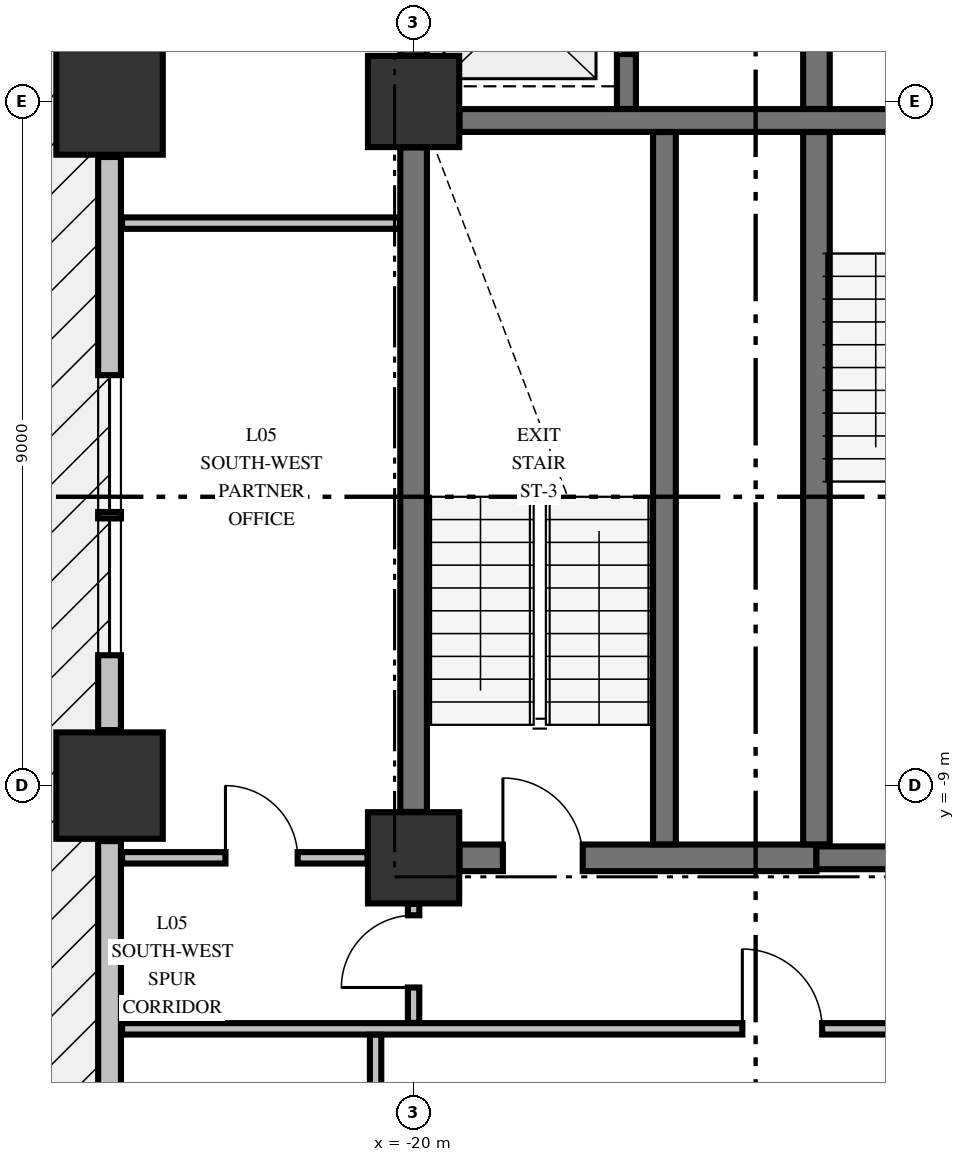
"""IFC4 building model, lengths in metres.
Left out: names, types, materials, properties, quantities, classifications, styles, units other than length and angle.
Written with IfcOpenShell. Run it as: python <this file> out.ifc"""

import sys

from ifc_helpers import new_model, si_unit, direction, frame, frame_2d, origin, origin_2d, place, context, subcontext, project, spatial, rectangle, extrude, element, fill, save


model = new_model("IFC4")
c1 = context("Model", 3, precision=1e-05, world=origin(), true_north=direction((0.0, 1.0)))
c2 = subcontext(c1, "Body", "Model", "MODEL_VIEW")
j1 = project(units=[si_unit("LENGTHUNIT", "METRE"), si_unit("PLANEANGLEUNIT", "RADIAN")], contexts=[c1])
p1 = place(None, origin())
s1 = spatial("IfcSite", under=j1, at=p1, CompositionType="ELEMENT")
p2 = place(p1, origin())
s2 = spatial("IfcBuilding", under=s1, at=p2, CompositionType="ELEMENT")
p3 = place(p2, frame((0.0, 0.0, 27.2)))
s3 = spatial("IfcBuildingStorey", under=s2, at=p3, CompositionType="ELEMENT", Elevation=27.2)
for number, where, z_axis, x_axis in (
    (1, (-24.0, -9.0, -0.45), (0.0, 0.0, 1.0), (1.0, 0.0, 0.0)),
    (2, (-24.0, 0.0, -0.45), (0.0, 0.0, 1.0), (1.0, 0.0, 0.0)),
):
    element("IfcColumn", number, at=place(p3, frame(where, z_axis=z_axis, x_axis=x_axis)), inside=s3, PredefinedType="COLUMN", context=c2, shape_type="SweptSolid", body=[
        extrude(rectangle(XDim=1.4, YDim=1.4, at=origin_2d()), origin(), (0.0, 0.0, 1.0), 3.77),
    ])
for number, where, z_axis, x_axis in (
    (3, (-20.0, -9.95, -0.45), (0.0, 0.0, 1.0), (1.0, 0.0, 0.0)),
    (4, (-20.0, 0.0, -0.45), (0.0, 0.0, 1.0), (1.0, 0.0, 0.0)),
):
    element("IfcColumn", number, at=place(p3, frame(where, z_axis=z_axis, x_axis=x_axis)), inside=s3, PredefinedType="COLUMN", context=c2, shape_type="SweptSolid", body=[
        extrude(rectangle(XDim=1.2, YDim=1.2, at=origin_2d()), origin(), (0.0, 0.0, 1.0), 3.77),
    ])
p4 = place(p3, frame((-24.0, -9.73, 0.0), z_axis=(0.0, 0.0, 1.0), x_axis=(0.0, -1.0, 0.0)))
e5 = element("IfcWall", 5, at=p4, inside=s3, PredefinedType="STANDARD", context=c2, shape_type="SweptSolid", body=[
    extrude(rectangle(XDim=12.54, YDim=0.3, at=frame_2d((6.27, 0.0))), origin(), (0.0, 0.0, 1.0), 2.712),
])
p5 = place(p3, frame((-24.0, -0.73, 0.0), z_axis=(0.0, 0.0, 1.0), x_axis=(0.0, -1.0, 0.0)))
e6 = element("IfcWall", 6, at=p5, inside=s3, PredefinedType="STANDARD", context=c2, shape_type="SweptSolid", body=[
    extrude(rectangle(XDim=7.54, YDim=0.3, at=frame_2d((3.77, 0.0))), origin(), (0.0, 0.0, 1.0), 2.712),
])
p6 = place(p5, frame((2.87, 0.0, 0.78)))
e7 = element("IfcOpeningElement", 7, at=p6, cuts=e6, PredefinedType="OPENING", context=c2, shape_type="SweptSolid", body=[
    extrude(rectangle(XDim=1.8, YDim=1.72, at=frame_2d((0.9, 0.86))), frame((0.0, 0.16, 0.0), z_axis=(0.0, -1.0, 0.0), x_axis=(1.0, 0.0, 0.0)), (0.0, 0.0, 1.0), 0.32),
])
p7 = place(p5, frame((4.755, 0.0, 0.78)))
e8 = element("IfcOpeningElement", 8, at=p7, cuts=e6, PredefinedType="OPENING", context=c2, shape_type="SweptSolid", body=[
    extrude(rectangle(XDim=1.8, YDim=1.72, at=frame_2d((0.9, 0.86))), frame((0.0, 0.16, 0.0), z_axis=(0.0, -1.0, 0.0), x_axis=(1.0, 0.0, 0.0)), (0.0, 0.0, 1.0), 0.32),
])
p8 = place(p3, frame((-19.396, -9.95, 0.0), z_axis=(0.0, 0.0, 1.0), x_axis=(1.0, 0.0, 0.0)))
e9 = element("IfcWall", 9, at=p8, inside=s3, PredefinedType="SHEAR", context=c2, shape_type="SweptSolid", body=[
    extrude(rectangle(XDim=4.696, YDim=0.35, at=frame_2d((2.348, 0.0))), origin(), (0.0, 0.0, 1.0), 3.32),
])
p9 = place(p8, frame((0.571, 0.0, 0.0)))
e10 = element("IfcOpeningElement", 10, at=p9, cuts=e9, PredefinedType="OPENING", context=c2, shape_type="SweptSolid", body=[
    extrude(rectangle(XDim=1.05, YDim=2.15, at=frame_2d((0.525, 1.075))), frame((0.0, 0.185, 0.0), z_axis=(0.0, -1.0, 0.0), x_axis=(1.0, 0.0, 0.0)), (0.0, 0.0, 1.0), 0.37),
])
p10 = place(p3, frame((-14.7, -9.95, 0.0), z_axis=(0.0, 0.0, 1.0), x_axis=(1.0, 0.0, 0.0)))
e11 = element("IfcWall", 11, at=p10, inside=s3, PredefinedType="SHEAR", context=c2, shape_type="SweptSolid", body=[
    extrude(rectangle(XDim=3.096, YDim=0.3, at=frame_2d((1.548, 0.0))), origin(), (0.0, 0.0, 1.0), 3.32),
])
p11 = place(p3, frame((-19.396, -0.25, 0.0), z_axis=(0.0, 0.0, 1.0), x_axis=(1.0, 0.0, 0.0)))
e12 = element("IfcWall", 12, at=p11, inside=s3, PredefinedType="SHEAR", context=c2, shape_type="SweptSolid", body=[
    extrude(rectangle(XDim=7.792, YDim=0.3, at=frame_2d((3.896, 0.0))), origin(), (0.0, 0.0, 1.0), 3.32),
])
p12 = place(p11, frame((5.696, 0.0, 0.0)))
e13 = element("IfcOpeningElement", 13, at=p12, cuts=e12, PredefinedType="OPENING", context=c2, shape_type="SweptSolid", body=[
    extrude(rectangle(XDim=1.1, YDim=2.15, at=frame_2d((0.55, 1.075))), frame((0.0, 0.16, 0.0), z_axis=(0.0, -1.0, 0.0), x_axis=(1.0, 0.0, 0.0)), (0.0, 0.0, 1.0), 0.32),
])
p13 = place(p3, frame((-23.835, -12.2, 0.0), z_axis=(0.0, 0.0, 1.0), x_axis=(1.0, 0.0, 0.0)))
e14 = element("IfcWall", 14, at=p13, inside=s3, PredefinedType="PARTITIONING", context=c2, shape_type="SweptSolid", body=[
    extrude(rectangle(XDim=52.67, YDim=0.15, at=frame_2d((26.335, 0.0))), origin(), (0.0, 0.0, 1.0), 3.32),
])
p14 = place(p13, frame((8.16, 0.0, 0.0)))
e15 = element("IfcOpeningElement", 15, at=p14, cuts=e14, PredefinedType="OPENING", context=c2, shape_type="SweptSolid", body=[
    extrude(rectangle(XDim=1.05, YDim=2.15, at=frame_2d((0.525, 1.075))), frame((0.0, 0.085, 0.0), z_axis=(0.0, -1.0, 0.0), x_axis=(1.0, 0.0, 0.0)), (0.0, 0.0, 1.0), 0.17),
])
p15 = place(p13, frame((18.31, 0.0, 0.0)))
e16 = element("IfcOpeningElement", 16, at=p15, cuts=e14, PredefinedType="OPENING", context=c2, shape_type="SweptSolid", body=[
    extrude(rectangle(XDim=1.05, YDim=2.15, at=frame_2d((0.525, 1.075))), frame((0.0, 0.085, 0.0), z_axis=(0.0, -1.0, 0.0), x_axis=(1.0, 0.0, 0.0)), (0.0, 0.0, 1.0), 0.17),
])
p16 = place(p13, frame((41.46, 0.0, 0.0)))
e17 = element("IfcOpeningElement", 17, at=p16, cuts=e14, PredefinedType="OPENING", context=c2, shape_type="SweptSolid", body=[
    extrude(rectangle(XDim=1.05, YDim=2.15, at=frame_2d((0.525, 1.075))), frame((0.0, 0.085, 0.0), z_axis=(0.0, -1.0, 0.0), x_axis=(1.0, 0.0, 0.0)), (0.0, 0.0, 1.0), 0.17),
])
p17 = place(p3, frame((-23.835, -9.95, 0.0), z_axis=(0.0, 0.0, 1.0), x_axis=(1.0, 0.0, 0.0)))
e18 = element("IfcWall", 18, at=p17, inside=s3, PredefinedType="PARTITIONING", context=c2, shape_type="SweptSolid", body=[
    extrude(rectangle(XDim=3.229, YDim=0.15, at=frame_2d((1.615, 0.0))), origin(), (0.0, 0.0, 1.0), 3.32),
])
p18 = place(p17, frame((1.36, 0.0, 0.0)))
e19 = element("IfcOpeningElement", 19, at=p18, cuts=e18, PredefinedType="OPENING", context=c2, shape_type="SweptSolid", body=[
    extrude(rectangle(XDim=0.95, YDim=2.15, at=frame_2d((0.475, 1.075))), frame((0.0, 0.085, 0.0), z_axis=(0.0, -1.0, 0.0), x_axis=(1.0, 0.0, 0.0)), (0.0, 0.0, 1.0), 0.17),
])
p19 = place(p3, frame((-23.835, -1.6, 0.0), z_axis=(0.0, 0.0, 1.0), x_axis=(1.0, 0.0, 0.0)))
e20 = element("IfcWall", 20, at=p19, inside=s3, PredefinedType="PARTITIONING", context=c2, shape_type="SweptSolid", body=[
    extrude(rectangle(XDim=3.657, YDim=0.15, at=frame_2d((1.829, 0.0))), origin(), (0.0, 0.0, 1.0), 3.32),
])
p20 = place(p3, frame((-20.0, -9.346, 0.0), z_axis=(0.0, 0.0, 1.0), x_axis=(0.0, 1.0, 0.0)))
e21 = element("IfcWall", 21, at=p20, inside=s3, PredefinedType="SHEAR", context=c2, shape_type="SweptSolid", body=[
    extrude(rectangle(XDim=8.742, YDim=0.35, at=frame_2d((4.371, 0.0))), origin(), (0.0, 0.0, 1.0), 3.32),
])
p21 = place(p3, frame((-20.0, 0.604, 0.0), z_axis=(0.0, 0.0, 1.0), x_axis=(0.0, 1.0, 0.0)))
e22 = element("IfcWall", 22, at=p21, inside=s3, PredefinedType="SHEAR", context=c2, shape_type="SweptSolid", body=[
    extrude(rectangle(XDim=1.869, YDim=0.35, at=frame_2d((0.935, 0.0))), origin(), (0.0, 0.0, 1.0), 3.32),
])
p22 = place(p3, frame((-17.2, -0.098, 0.0), z_axis=(0.0, 0.0, 1.0), x_axis=(0.0, 1.0, 0.0)))
e23 = element("IfcWall", 23, at=p22, inside=s3, PredefinedType="SOLIDWALL", context=c2, shape_type="SweptSolid", body=[
    extrude(rectangle(XDim=2.571, YDim=0.25, at=frame_2d((1.285, 0.0))), origin(), (0.0, 0.0, 1.0), 3.32),
])
p23 = place(p22, frame((0.723, 0.0, 0.0)))
e24 = element("IfcOpeningElement", 24, at=p23, cuts=e23, PredefinedType="OPENING", context=c2, shape_type="SweptSolid", body=[
    extrude(rectangle(XDim=1.1, YDim=2.2, at=frame_2d((0.55, 1.1))), frame((0.0, 0.135, 0.0), z_axis=(0.0, -1.0, 0.0), x_axis=(1.0, 0.0, 0.0)), (0.0, 0.0, 1.0), 0.27),
])
p24 = place(p3, frame((-16.7, -9.773, 0.0), z_axis=(0.0, 0.0, 1.0), x_axis=(0.0, 1.0, 0.0)))
e25 = element("IfcWall", 25, at=p24, inside=s3, PredefinedType="SHEAR", context=c2, shape_type="SweptSolid", body=[
    extrude(rectangle(XDim=9.371, YDim=0.3, at=frame_2d((4.686, 0.0))), origin(), (0.0, 0.0, 1.0), 3.32),
])
p25 = place(p3, frame((-14.7, -9.773, 0.0), z_axis=(0.0, 0.0, 1.0), x_axis=(0.0, 1.0, 0.0)))
e26 = element("IfcWall", 26, at=p25, inside=s3, PredefinedType="SHEAR", context=c2, shape_type="SweptSolid", body=[
    extrude(rectangle(XDim=9.371, YDim=0.35, at=frame_2d((4.686, 0.0))), origin(), (0.0, 0.0, 1.0), 3.32),
])
p26 = place(p3, frame((-14.7, -0.098, 0.0), z_axis=(0.0, 0.0, 1.0), x_axis=(0.0, 1.0, 0.0)))
e27 = element("IfcWall", 27, at=p26, inside=s3, PredefinedType="SHEAR", context=c2, shape_type="SweptSolid", body=[
    extrude(rectangle(XDim=2.846, YDim=0.35, at=frame_2d((1.423, 0.0))), origin(), (0.0, 0.0, 1.0), 3.32),
])
p27 = place(p3, frame((-20.5, -22.294, 0.0), z_axis=(0.0, 0.0, 1.0), x_axis=(0.0, 1.0, 0.0)))
e28 = element("IfcWall", 28, at=p27, inside=s3, PredefinedType="PARTITIONING", context=c2, shape_type="SweptSolid", body=[
    extrude(rectangle(XDim=10.016, YDim=0.15, at=frame_2d((5.008, 0.0))), origin(), (0.0, 0.0, 1.0), 3.32),
])
p28 = place(p3, frame((-20.0, -12.122, 0.0), z_axis=(0.0, 0.0, 1.0), x_axis=(0.0, 1.0, 0.0)))
e29 = element("IfcWall", 29, at=p28, inside=s3, PredefinedType="PARTITIONING", context=c2, shape_type="SweptSolid", body=[
    extrude(rectangle(XDim=1.566, YDim=0.15, at=frame_2d((0.783, 0.0))), origin(), (0.0, 0.0, 1.0), 3.32),
])
p29 = place(p28, frame((0.466, 0.0, 0.0)))
e30 = element("IfcOpeningElement", 30, at=p29, cuts=e29, PredefinedType="OPENING", context=c2, shape_type="SweptSolid", body=[
    extrude(rectangle(XDim=0.95, YDim=2.15, at=frame_2d((0.475, 1.075))), frame((0.0, 0.085, 0.0), z_axis=(0.0, -1.0, 0.0), x_axis=(1.0, 0.0, 0.0)), (0.0, 0.0, 1.0), 0.17),
])
p30 = place(p6, origin())
e31 = element("IfcWindow", 31, at=p30, inside=s3, PartitioningType="SINGLE_PANEL", PredefinedType="WINDOW", context=c2, shape_type="SweptSolid", body=[
    extrude(rectangle(XDim=1.8, YDim=1.72, at=frame_2d((0.9, 0.86))), frame((0.0, 0.03, 0.0), z_axis=(0.0, -1.0, 0.0), x_axis=(1.0, 0.0, 0.0)), (0.0, 0.0, 1.0), 0.06),
])
fill(e7, e31)
p31 = place(p7, origin())
e32 = element("IfcWindow", 32, at=p31, inside=s3, PartitioningType="SINGLE_PANEL", PredefinedType="WINDOW", context=c2, shape_type="SweptSolid", body=[
    extrude(rectangle(XDim=1.8, YDim=1.72, at=frame_2d((0.9, 0.86))), frame((0.0, 0.03, 0.0), z_axis=(0.0, -1.0, 0.0), x_axis=(1.0, 0.0, 0.0)), (0.0, 0.0, 1.0), 0.06),
])
fill(e8, e32)
p32 = place(p9, origin())
e33 = element("IfcDoor", 33, at=p32, inside=s3, OperationType="SINGLE_SWING_LEFT", PredefinedType="DOOR", context=c2, shape_type="SweptSolid", body=[
    extrude(rectangle(XDim=1.05, YDim=2.15, at=frame_2d((0.525, 1.075))), frame((0.0, 0.025, 0.0), z_axis=(0.0, -1.0, 0.0), x_axis=(1.0, 0.0, 0.0)), (0.0, 0.0, 1.0), 0.05),
])
fill(e10, e33)
p33 = place(p23, origin())
e34 = element("IfcDoor", 34, at=p33, inside=s3, OperationType="SLIDING_TO_LEFT", PredefinedType="DOOR", context=c2, shape_type="SweptSolid", body=[
    extrude(rectangle(XDim=1.1, YDim=2.2, at=frame_2d((0.55, 1.1))), frame((0.0, 0.025, 0.0), z_axis=(0.0, -1.0, 0.0), x_axis=(1.0, 0.0, 0.0)), (0.0, 0.0, 1.0), 0.05),
])
fill(e24, e34)
p34 = place(p14, origin())
e35 = element("IfcDoor", 35, at=p34, inside=s3, OperationType="SINGLE_SWING_LEFT", PredefinedType="DOOR", context=c2, shape_type="SweptSolid", body=[
    extrude(rectangle(XDim=1.05, YDim=2.15, at=frame_2d((0.525, 1.075))), frame((0.0, 0.025, 0.0), z_axis=(0.0, -1.0, 0.0), x_axis=(1.0, 0.0, 0.0)), (0.0, 0.0, 1.0), 0.05),
])
fill(e15, e35)
p35 = place(p29, origin())
e36 = element("IfcDoor", 36, at=p35, inside=s3, OperationType="SINGLE_SWING_LEFT", PredefinedType="DOOR", context=c2, shape_type="SweptSolid", body=[
    extrude(rectangle(XDim=0.95, YDim=2.15, at=frame_2d((0.475, 1.075))), frame((0.0, 0.025, 0.0), z_axis=(0.0, -1.0, 0.0), x_axis=(1.0, 0.0, 0.0)), (0.0, 0.0, 1.0), 0.05),
])
fill(e30, e36)
p36 = place(p18, origin())
e37 = element("IfcDoor", 37, at=p36, inside=s3, OperationType="SINGLE_SWING_LEFT", PredefinedType="DOOR", context=c2, shape_type="SweptSolid", body=[
    extrude(rectangle(XDim=0.95, YDim=2.15, at=frame_2d((0.475, 1.075))), frame((0.0, 0.025, 0.0), z_axis=(0.0, -1.0, 0.0), x_axis=(1.0, 0.0, 0.0)), (0.0, 0.0, 1.0), 0.05),
])
fill(e19, e37)
save(model, sys.argv[1])
